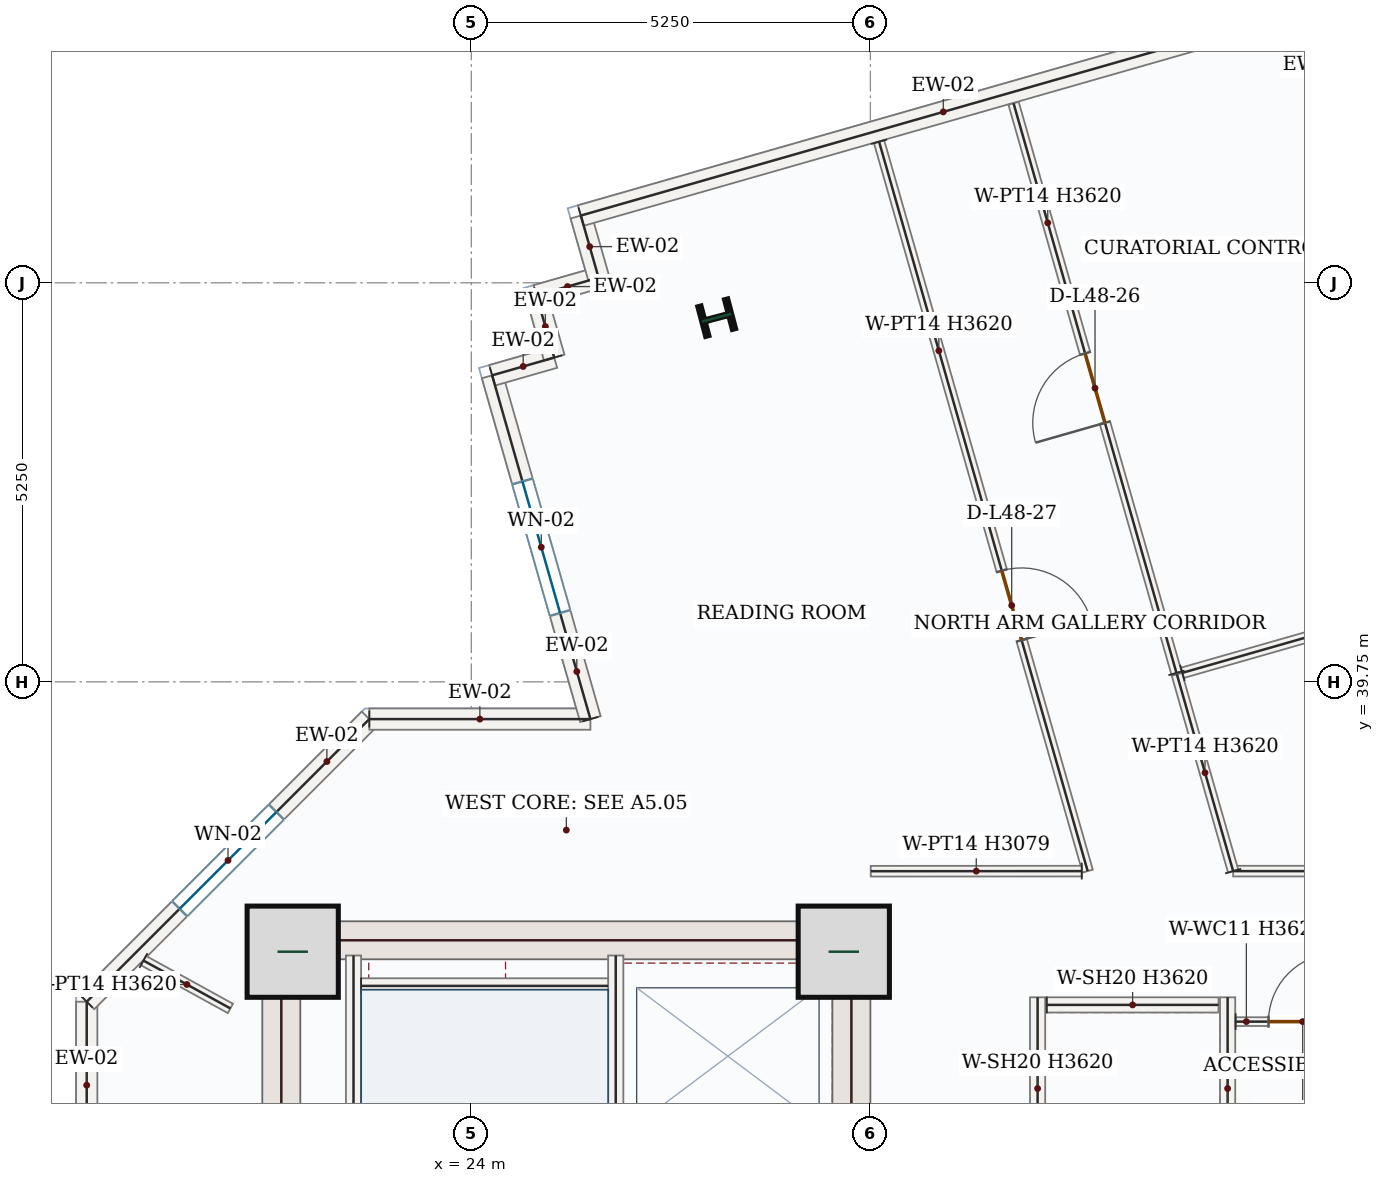
"""IFC4 building model, lengths in metres.
Left out: names, types, materials, properties, quantities, classifications, styles, units other than length and angle.
Written with IfcOpenShell. Run it as: python <this file> out.ifc"""

import sys

from ifc_helpers import new_model, si_unit, direction, frame, frame_2d, origin, origin_2d, place, context, subcontext, project, spatial, rectangle, i_section, extrude, source, transform, mapped, element, fill, save


model = new_model("IFC4")
c1 = context("Model", 3, precision=1e-05, world=origin(), true_north=direction((0.0, 1.0)))
c2 = subcontext(c1, "Body", "Model", "MODEL_VIEW")
j1 = project(units=[si_unit("LENGTHUNIT", "METRE"), si_unit("PLANEANGLEUNIT", "RADIAN")], contexts=[c1])
p1 = place(None, origin())
s1 = spatial("IfcSite", under=j1, at=p1, CompositionType="ELEMENT")
p2 = place(p1, origin())
s2 = spatial("IfcBuilding", under=s1, at=p2, CompositionType="ELEMENT")
p3 = place(p2, frame((0.0, 0.0, 205.8)))
s3 = spatial("IfcBuildingStorey", under=s2, at=p3, CompositionType="ELEMENT", Elevation=205.8)
m1 = source(origin(), c2, "Body", "SweptSolid", [
    extrude(rectangle(XDim=8.55, YDim=0.5, at=frame_2d((4.275, 0.0))), origin(), (0.0, 0.0, 1.0), 3.62),
])
p4 = place(p3, frame((21.5, 28.05, 0.0), z_axis=(0.0, 0.0, 1.0), x_axis=(0.0, 1.0, 0.0)))
e1 = element("IfcWall", 1, at=p4, inside=s3, PredefinedType="SHEAR", context=c2, shape_type="MappedRepresentation", body=[
    mapped(m1, transform((0.0, 0.0, 0.0), x_axis=(1.0, 0.0, 0.0), y_axis=(0.0, 1.0, 0.0), z_axis=(0.0, 0.0, 1.0), scale=1.0)),
])
p5 = place(p3, frame((29.0, 28.05, 0.0), z_axis=(0.0, 0.0, 1.0), x_axis=(0.0, 1.0, 0.0)))
e2 = element("IfcWall", 2, at=p5, inside=s3, PredefinedType="SHEAR", context=c2, shape_type="SweptSolid", body=[
    extrude(rectangle(XDim=8.55, YDim=0.5, at=frame_2d((4.275, 0.0))), origin(), (0.0, 0.0, 1.0), 3.62),
])
p6 = place(p5, frame((1.5, 0.0, 0.0)))
e3 = element("IfcOpeningElement", 3, at=p6, cuts=e2, PredefinedType="OPENING", context=c2, shape_type="SweptSolid", body=[
    extrude(rectangle(XDim=1.1, YDim=2.2, at=frame_2d((0.55, 1.1))), frame((0.0, 0.26, 0.0), z_axis=(0.0, -1.0, 0.0), x_axis=(1.0, 0.0, 0.0)), (0.0, 0.0, 1.0), 0.52),
])
m2 = source(origin(), c2, "Body", "SweptSolid", [
    extrude(rectangle(XDim=7.0, YDim=0.5, at=frame_2d((3.5, 0.0))), origin(), (0.0, 0.0, 1.0), 3.62),
])
p7 = place(p3, frame((21.75, 36.35, 0.0), z_axis=(0.0, 0.0, 1.0), x_axis=(1.0, 0.0, 0.0)))
e4 = element("IfcWall", 4, at=p7, inside=s3, PredefinedType="SHEAR", context=c2, shape_type="MappedRepresentation", body=[
    mapped(m2, transform((0.0, 0.0, 0.0), x_axis=(1.0, 0.0, 0.0), y_axis=(0.0, 1.0, 0.0), z_axis=(0.0, 0.0, 1.0), scale=1.0)),
])
m3 = source(origin(), c2, "Body", "SweptSolid", [
    extrude(rectangle(XDim=1.2, YDim=1.2, at=origin_2d()), origin(), (0.0, 0.0, 1.0), 3.9),
])
for number, where, z_axis, x_axis in (
    (5, (21.65, 36.2, 0.0), (0.0, 0.0, 1.0), (1.0, 0.0, 0.0)),
    (6, (28.9, 36.2, 0.0), (0.0, 0.0, 1.0), (1.0, 0.0, 0.0)),
):
    element("IfcColumn", number, at=place(p3, frame(where, z_axis=z_axis, x_axis=x_axis)), inside=s3, PredefinedType="COLUMN", context=c2, shape_type="MappedRepresentation", body=[
        mapped(m3, transform((0.0, 0.0, 0.0), x_axis=(1.0, 0.0, 0.0), y_axis=(0.0, 1.0, 0.0), z_axis=(0.0, 0.0, 1.0), scale=1.0)),
    ])
m4 = source(origin(), c2, "Body", "SweptSolid", [
    extrude(i_section(OverallWidth=0.404, OverallDepth=0.407, WebThickness=0.027, FlangeThickness=0.044, FilletRadius=0.018, at=origin_2d()), origin(), (0.0, 0.0, 1.0), 3.9),
])
p8 = place(p3, frame((27.228, 44.541, 0.0), z_axis=(0.0, 0.0, 1.0), x_axis=(-0.255445757936, 0.966823388604, 0.0)))
e7 = element("IfcColumn", 7, at=p8, inside=s3, PredefinedType="COLUMN", context=c2, shape_type="MappedRepresentation", body=[
    mapped(m4, transform((0.0, 0.0, 0.0), x_axis=(1.0, 0.0, 0.0), y_axis=(0.0, 1.0, 0.0), z_axis=(0.0, 0.0, 1.0), scale=1.0)),
])
p9 = place(p3, frame((18.94, 29.048, 0.0), z_axis=(0.0, 0.0, 1.0), x_axis=(0.0, 1.0, 0.0)))
e8 = element("IfcWall", 8, at=p9, inside=s3, PredefinedType="SOLIDWALL", context=c2, shape_type="SweptSolid", body=[
    extrude(rectangle(XDim=6.494, YDim=0.28, at=frame_2d((3.247, 0.0))), origin(), (0.0, 0.0, 1.0), 3.62),
])
p10 = place(p9, frame((2.347, 0.0, 0.85)))
e9 = element("IfcOpeningElement", 9, at=p10, cuts=e8, PredefinedType="OPENING", context=c2, shape_type="SweptSolid", body=[
    extrude(rectangle(XDim=1.8, YDim=1.75, at=frame_2d((0.9, 0.875))), frame((0.0, 0.15, 0.0), z_axis=(0.0, -1.0, 0.0), x_axis=(1.0, 0.0, 0.0)), (0.0, 0.0, 1.0), 0.3),
])
p11 = place(p3, frame((18.94, 35.542, 0.0), z_axis=(0.0, 0.0, 1.0), x_axis=(0.707106781187, 0.707106781187, 0.0)))
e10 = element("IfcWall", 10, at=p11, inside=s3, PredefinedType="SOLIDWALL", context=c2, shape_type="SweptSolid", body=[
    extrude(rectangle(XDim=5.258, YDim=0.28, at=frame_2d((2.629, 0.0))), origin(), (0.0, 0.0, 1.0), 3.62),
])
p12 = place(p11, frame((1.729, 0.0, 0.85)))
e11 = element("IfcOpeningElement", 11, at=p12, cuts=e10, PredefinedType="OPENING", context=c2, shape_type="SweptSolid", body=[
    extrude(rectangle(XDim=1.8, YDim=1.75, at=frame_2d((0.9, 0.875))), frame((0.0, 0.15, 0.0), z_axis=(0.0, -1.0, 0.0), x_axis=(1.0, 0.0, 0.0)), (0.0, 0.0, 1.0), 0.3),
])
m5 = source(origin(), c2, "Body", "SweptSolid", [
    extrude(rectangle(XDim=2.909, YDim=0.28, at=frame_2d((1.455, 0.0))), origin(), (0.0, 0.0, 1.0), 3.62),
])
p13 = place(p3, frame((22.658, 39.26, 0.0), z_axis=(0.0, 0.0, 1.0), x_axis=(1.0, 0.0, 0.0)))
e12 = element("IfcWall", 12, at=p13, inside=s3, PredefinedType="SOLIDWALL", context=c2, shape_type="MappedRepresentation", body=[
    mapped(m5, transform((0.0, 0.0, 0.0), x_axis=(1.0, 0.0, 0.0), y_axis=(0.0, 1.0, 0.0), z_axis=(0.0, 0.0, 1.0), scale=1.0)),
])
p14 = place(p3, frame((25.567, 39.26, 0.0), z_axis=(0.0, 0.0, 1.0), x_axis=(-0.274981611661, 0.961449485542, 0.0)))
e13 = element("IfcWall", 13, at=p14, inside=s3, PredefinedType="SOLIDWALL", context=c2, shape_type="SweptSolid", body=[
    extrude(rectangle(XDim=4.704, YDim=0.28, at=frame_2d((2.352, 0.0))), origin(), (0.0, 0.0, 1.0), 3.62),
])
p15 = place(p14, frame((1.452, 0.0, 0.85)))
e14 = element("IfcOpeningElement", 14, at=p15, cuts=e13, PredefinedType="OPENING", context=c2, shape_type="SweptSolid", body=[
    extrude(rectangle(XDim=1.8, YDim=1.75, at=frame_2d((0.9, 0.875))), frame((0.0, 0.15, 0.0), z_axis=(0.0, -1.0, 0.0), x_axis=(1.0, 0.0, 0.0)), (0.0, 0.0, 1.0), 0.3),
])
m6 = source(origin(), c2, "Body", "SweptSolid", [
    extrude(rectangle(XDim=0.85, YDim=0.28, at=frame_2d((0.425, 0.0))), origin(), (0.0, 0.0, 1.0), 3.62),
])
p16 = place(p3, frame((24.273, 43.782, 0.0), z_axis=(0.0, 0.0, 1.0), x_axis=(0.961469728335, 0.274910824624, 0.0)))
e15 = element("IfcWall", 15, at=p16, inside=s3, PredefinedType="SOLIDWALL", context=c2, shape_type="MappedRepresentation", body=[
    mapped(m6, transform((0.0, 0.0, 0.0), x_axis=(1.0, 0.0, 0.0), y_axis=(0.0, 1.0, 0.0), z_axis=(0.0, 0.0, 1.0), scale=1.0)),
])
m7 = source(origin(), c2, "Body", "SweptSolid", [
    extrude(rectangle(XDim=0.85, YDim=0.28, at=frame_2d((0.425, 0.0))), origin(), (0.0, 0.0, 1.0), 3.62),
])
p17 = place(p3, frame((25.091, 44.016, 0.0), z_axis=(0.0, 0.0, 1.0), x_axis=(-0.274834915789, 0.961491429532, 0.0)))
e16 = element("IfcWall", 16, at=p17, inside=s3, PredefinedType="SOLIDWALL", context=c2, shape_type="MappedRepresentation", body=[
    mapped(m7, transform((0.0, 0.0, 0.0), x_axis=(1.0, 0.0, 0.0), y_axis=(0.0, 1.0, 0.0), z_axis=(0.0, 0.0, 1.0), scale=1.0)),
])
p18 = place(p3, frame((24.857, 44.833, 0.0), z_axis=(0.0, 0.0, 1.0), x_axis=(0.961469728335, 0.274910824624, 0.0)))
e17 = element("IfcWall", 17, at=p18, inside=s3, PredefinedType="SOLIDWALL", context=c2, shape_type="MappedRepresentation", body=[
    mapped(m6, transform((0.0, 0.0, 0.0), x_axis=(1.0, 0.0, 0.0), y_axis=(0.0, 1.0, 0.0), z_axis=(0.0, 0.0, 1.0), scale=1.0)),
])
p19 = place(p3, frame((25.674, 45.067, 0.0), z_axis=(0.0, 0.0, 1.0), x_axis=(-0.274834915789, 0.961491429532, 0.0)))
e18 = element("IfcWall", 18, at=p19, inside=s3, PredefinedType="SOLIDWALL", context=c2, shape_type="MappedRepresentation", body=[
    mapped(m7, transform((0.0, 0.0, 0.0), x_axis=(1.0, 0.0, 0.0), y_axis=(0.0, 1.0, 0.0), z_axis=(0.0, 0.0, 1.0), scale=1.0)),
])
m8 = source(origin(), c2, "Body", "SweptSolid", [
    extrude(rectangle(XDim=9.92, YDim=0.28, at=frame_2d((4.96, 0.0))), origin(), (0.0, 0.0, 1.0), 3.62),
])
p20 = place(p3, frame((25.44, 45.885, 0.0), z_axis=(0.0, 0.0, 1.0), x_axis=(0.961457051276, 0.274955157346, 0.0)))
e19 = element("IfcWall", 19, at=p20, inside=s3, PredefinedType="SOLIDWALL", context=c2, shape_type="MappedRepresentation", body=[
    mapped(m8, transform((0.0, 0.0, 0.0), x_axis=(1.0, 0.0, 0.0), y_axis=(0.0, 1.0, 0.0), z_axis=(0.0, 0.0, 1.0), scale=1.0)),
])
p21 = place(p3, frame((34.978, 48.612, 0.0), z_axis=(0.0, 0.0, 1.0), x_axis=(0.275176346112, -0.961393768724, 0.0)))
e20 = element("IfcWall", 20, at=p21, inside=s3, PredefinedType="SOLIDWALL", context=c2, shape_type="MappedRepresentation", body=[
    mapped(m6, transform((0.0, 0.0, 0.0), x_axis=(1.0, 0.0, 0.0), y_axis=(0.0, 1.0, 0.0), z_axis=(0.0, 0.0, 1.0), scale=1.0)),
])
m9 = source(origin(), c2, "Body", "SweptSolid", [
    extrude(rectangle(XDim=7.87, YDim=0.2, at=frame_2d((3.935, 0.0))), origin(), (0.0, 0.0, 1.0), 3.62),
])
p22 = place(p3, frame((22.45, 28.28, 0.0), z_axis=(0.0, 0.0, 1.0), x_axis=(0.0, 1.0, 0.0)))
e21 = element("IfcWall", 21, at=p22, inside=s3, PredefinedType="SOLIDWALL", context=c2, shape_type="MappedRepresentation", body=[
    mapped(m9, transform((0.0, 0.0, 0.0), x_axis=(1.0, 0.0, 0.0), y_axis=(0.0, 1.0, 0.0), z_axis=(0.0, 0.0, 1.0), scale=1.0)),
])
p23 = place(p3, frame((25.9, 28.15, 0.0), z_axis=(0.0, 0.0, 1.0), x_axis=(0.0, 1.0, 0.0)))
e22 = element("IfcWall", 22, at=p23, inside=s3, PredefinedType="SOLIDWALL", context=c2, shape_type="SweptSolid", body=[
    extrude(rectangle(XDim=8.0, YDim=0.2, at=frame_2d((4.0, 0.0))), origin(), (0.0, 0.0, 1.0), 3.62),
])
p24 = place(p23, frame((0.4, 0.0, 0.0)))
e23 = element("IfcOpeningElement", 23, at=p24, cuts=e22, PredefinedType="OPENING", context=c2, shape_type="SweptSolid", body=[
    extrude(rectangle(XDim=1.05, YDim=2.15, at=frame_2d((0.525, 1.075))), frame((0.0, 0.11, 0.0), z_axis=(0.0, -1.0, 0.0), x_axis=(1.0, 0.0, 0.0)), (0.0, 0.0, 1.0), 0.22),
])
m10 = source(origin(), c2, "Body", "SweptSolid", [
    extrude(rectangle(XDim=3.25, YDim=0.2, at=frame_2d((1.625, 0.0))), origin(), (0.0, 0.0, 1.0), 3.62),
])
p25 = place(p3, frame((22.55, 35.75, 0.0), z_axis=(0.0, 0.0, 1.0), x_axis=(1.0, 0.0, 0.0)))
e24 = element("IfcWall", 24, at=p25, inside=s3, PredefinedType="SOLIDWALL", context=c2, shape_type="MappedRepresentation", body=[
    mapped(m10, transform((0.0, 0.0, 0.0), x_axis=(1.0, 0.0, 0.0), y_axis=(0.0, 1.0, 0.0), z_axis=(0.0, 0.0, 1.0), scale=1.0)),
])
m11 = source(origin(), c2, "Body", "SweptSolid", [
    extrude(rectangle(XDim=2.4, YDim=0.2, at=frame_2d((1.2, 0.0))), origin(), (0.0, 0.0, 1.0), 3.62),
])
for number, where, z_axis, x_axis in (
    (25, (31.45, 33.2, 0.0), (0.0, 0.0, 1.0), (0.0, 1.0, 0.0)),
    (26, (33.95, 33.2, 0.0), (0.0, 0.0, 1.0), (0.0, 1.0, 0.0)),
):
    element("IfcWall", number, at=place(p3, frame(where, z_axis=z_axis, x_axis=x_axis)), inside=s3, PredefinedType="SOLIDWALL", context=c2, shape_type="MappedRepresentation", body=[
        mapped(m11, transform((0.0, 0.0, 0.0), x_axis=(1.0, 0.0, 0.0), y_axis=(0.0, 1.0, 0.0), z_axis=(0.0, 0.0, 1.0), scale=1.0)),
    ])
m12 = source(origin(), c2, "Body", "SweptSolid", [
    extrude(rectangle(XDim=2.26, YDim=0.2, at=frame_2d((1.13, 0.0))), origin(), (0.0, 0.0, 1.0), 3.62),
])
p26 = place(p3, frame((31.57, 35.5, 0.0), z_axis=(0.0, 0.0, 1.0), x_axis=(1.0, 0.0, 0.0)))
e27 = element("IfcWall", 27, at=p26, inside=s3, PredefinedType="SOLIDWALL", context=c2, shape_type="MappedRepresentation", body=[
    mapped(m12, transform((0.0, 0.0, 0.0), x_axis=(1.0, 0.0, 0.0), y_axis=(0.0, 1.0, 0.0), z_axis=(0.0, 0.0, 1.0), scale=1.0)),
])
p27 = place(p3, frame((34.055, 35.28, 0.0), z_axis=(0.0, 0.0, 1.0), x_axis=(1.0, 0.0, 0.0)))
e28 = element("IfcWall", 28, at=p27, inside=s3, PredefinedType="PARTITIONING", context=c2, shape_type="SweptSolid", body=[
    extrude(rectangle(XDim=1.473, YDim=0.115, at=frame_2d((0.736, 0.0))), origin(), (0.0, 0.0, 1.0), 3.62),
])
p28 = place(p27, frame((0.433, 0.0, 0.0)))
e29 = element("IfcOpeningElement", 29, at=p28, cuts=e28, PredefinedType="OPENING", context=c2, shape_type="SweptSolid", body=[
    extrude(rectangle(XDim=0.9, YDim=2.1, at=frame_2d((0.45, 1.05))), frame((0.0, 0.067, 0.0), z_axis=(0.0, -1.0, 0.0), x_axis=(1.0, 0.0, 0.0)), (0.0, 0.0, 1.0), 0.135),
])
p29 = place(p3, frame((41.775, 37.26, 0.0), z_axis=(0.0, 0.0, 1.0), x_axis=(-1.0, 0.0, 0.0)))
e30 = element("IfcWall", 30, at=p29, inside=s3, PredefinedType="PARTITIONING", context=c2, shape_type="SweptSolid", body=[
    extrude(rectangle(XDim=7.753, YDim=0.14, at=frame_2d((3.876, 0.0))), origin(), (0.0, 0.0, 1.0), 3.62),
])
p30 = place(p29, frame((5.306, 0.0, 0.0)))
e31 = element("IfcOpeningElement", 31, at=p30, cuts=e30, PredefinedType="OPENING", context=c2, shape_type="SweptSolid", body=[
    extrude(rectangle(XDim=0.95, YDim=2.15, at=frame_2d((0.475, 1.075))), frame((0.0, 0.08, 0.0), z_axis=(0.0, -1.0, 0.0), x_axis=(1.0, 0.0, 0.0)), (0.0, 0.0, 1.0), 0.16),
])
m13 = source(origin(), c2, "Body", "SweptSolid", [
    extrude(rectangle(XDim=2.692, YDim=0.14, at=frame_2d((1.346, 0.0))), origin(), (0.0, 0.0, 1.0), 3.62),
])
p31 = place(p3, frame((34.023, 37.26, 0.0), z_axis=(0.0, 0.0, 1.0), x_axis=(-0.27500862401, 0.961441759401, 0.0)))
e32 = element("IfcWall", 32, at=p31, inside=s3, PredefinedType="PARTITIONING", context=c2, shape_type="MappedRepresentation", body=[
    mapped(m13, transform((0.0, 0.0, 0.0), x_axis=(1.0, 0.0, 0.0), y_axis=(0.0, 1.0, 0.0), z_axis=(0.0, 0.0, 1.0), scale=1.0)),
])
m14 = source(origin(), c2, "Body", "SweptSolid", [
    extrude(rectangle(XDim=5.52, YDim=0.14, at=frame_2d((2.76, 0.0))), origin(), (0.0, 0.0, 1.0), 3.62),
])
p32 = place(p3, frame((33.354, 39.869, 0.0), z_axis=(0.0, 0.0, 1.0), x_axis=(0.961455490798, 0.274960613933, 0.0)))
e33 = element("IfcWall", 33, at=p32, inside=s3, PredefinedType="PARTITIONING", context=c2, shape_type="MappedRepresentation", body=[
    mapped(m14, transform((0.0, 0.0, 0.0), x_axis=(1.0, 0.0, 0.0), y_axis=(0.0, 1.0, 0.0), z_axis=(0.0, 0.0, 1.0), scale=1.0)),
])
p33 = place(p3, frame((33.277, 39.867, 0.0), z_axis=(0.0, 0.0, 1.0), x_axis=(-0.274985856522, 0.96144827147, 0.0)))
e34 = element("IfcWall", 34, at=p33, inside=s3, PredefinedType="PARTITIONING", context=c2, shape_type="SweptSolid", body=[
    extrude(rectangle(XDim=7.795, YDim=0.14, at=frame_2d((3.897, 0.0))), origin(), (0.0, 0.0, 1.0), 3.62),
])
p34 = place(p33, frame((3.423, 0.0, 0.0)))
e35 = element("IfcOpeningElement", 35, at=p34, cuts=e34, PredefinedType="OPENING", context=c2, shape_type="SweptSolid", body=[
    extrude(rectangle(XDim=0.95, YDim=2.15, at=frame_2d((0.475, 1.075))), frame((0.0, 0.08, 0.0), z_axis=(0.0, -1.0, 0.0), x_axis=(1.0, 0.0, 0.0)), (0.0, 0.0, 1.0), 0.16),
])
m15 = source(origin(), c2, "Body", "SweptSolid", [
    extrude(rectangle(XDim=1.305, YDim=0.14, at=frame_2d((0.653, 0.0))), origin(), (0.0, 0.0, 1.0), 3.62),
])
p35 = place(p3, frame((19.686, 36.083, 0.0), z_axis=(0.0, 0.0, 1.0), x_axis=(0.876117183384, -0.48209820678, 0.0)))
e36 = element("IfcWall", 36, at=p35, inside=s3, PredefinedType="PARTITIONING", context=c2, shape_type="MappedRepresentation", body=[
    mapped(m15, transform((0.0, 0.0, 0.0), x_axis=(1.0, 0.0, 0.0), y_axis=(0.0, 1.0, 0.0), z_axis=(0.0, 0.0, 1.0), scale=1.0)),
])
p36 = place(p3, frame((29.365, 46.856, 0.0), z_axis=(0.0, 0.0, 1.0), x_axis=(0.274969885882, -0.961452839123, 0.0)))
e37 = element("IfcWall", 37, at=p36, inside=s3, PredefinedType="PARTITIONING", context=c2, shape_type="SweptSolid", body=[
    extrude(rectangle(XDim=9.981, YDim=0.14, at=frame_2d((4.99, 0.0))), origin(), (0.0, 0.0, 1.0), 3.62),
])
p37 = place(p36, frame((5.87, 0.0, 0.0)))
e38 = element("IfcOpeningElement", 38, at=p37, cuts=e37, PredefinedType="OPENING", context=c2, shape_type="SweptSolid", body=[
    extrude(rectangle(XDim=0.95, YDim=2.15, at=frame_2d((0.475, 1.075))), frame((0.0, 0.08, 0.0), z_axis=(0.0, -1.0, 0.0), x_axis=(1.0, 0.0, 0.0)), (0.0, 0.0, 1.0), 0.16),
])
m16 = source(origin(), c2, "Body", "SweptSolid", [
    extrude(rectangle(XDim=2.776, YDim=0.14, at=frame_2d((1.388, 0.0))), origin(), (0.0, 0.0, 1.0), 3.079),
])
p38 = place(p3, frame((32.031, 37.26, 0.0), z_axis=(0.0, 0.0, 1.0), x_axis=(-0.999999903325, -0.000439715022, 0.0)))
e39 = element("IfcWall", 39, at=p38, inside=s3, PredefinedType="PARTITIONING", context=c2, shape_type="MappedRepresentation", body=[
    mapped(m16, transform((0.0, 0.0, 0.0), x_axis=(1.0, 0.0, 0.0), y_axis=(0.0, 1.0, 0.0), z_axis=(0.0, 0.0, 1.0), scale=1.0)),
])
m17 = source(origin(), c2, "Body", "SweptSolid", [
    extrude(rectangle(XDim=1.8, YDim=1.75, at=frame_2d((0.9, 0.875))), frame((0.0, 0.03, 0.0), z_axis=(0.0, -1.0, 0.0), x_axis=(1.0, 0.0, 0.0)), (0.0, 0.0, 1.0), 0.06),
])
p39 = place(p12, origin())
e40 = element("IfcWindow", 40, at=p39, inside=s3, PartitioningType="DOUBLE_PANEL_VERTICAL", PredefinedType="WINDOW", context=c2, shape_type="MappedRepresentation", body=[
    mapped(m17, transform((0.0, 0.0, 0.0), x_axis=(1.0, 0.0, 0.0), y_axis=(0.0, 1.0, 0.0), z_axis=(0.0, 0.0, 1.0), scale=1.0)),
])
fill(e11, e40)
p40 = place(p15, origin())
e41 = element("IfcWindow", 41, at=p40, inside=s3, PartitioningType="DOUBLE_PANEL_VERTICAL", PredefinedType="WINDOW", context=c2, shape_type="MappedRepresentation", body=[
    mapped(m17, transform((0.0, 0.0, 0.0), x_axis=(1.0, 0.0, 0.0), y_axis=(0.0, 1.0, 0.0), z_axis=(0.0, 0.0, 1.0), scale=1.0)),
])
fill(e14, e41)
m18 = source(origin(), c2, "Body", "SweptSolid", [
    extrude(rectangle(XDim=0.9, YDim=2.1, at=frame_2d((0.45, 1.05))), frame((0.0, 0.025, 0.0), z_axis=(0.0, -1.0, 0.0), x_axis=(1.0, 0.0, 0.0)), (0.0, 0.0, 1.0), 0.05),
])
p41 = place(p28, origin())
e42 = element("IfcDoor", 42, at=p41, inside=s3, OperationType="SINGLE_SWING_RIGHT", PredefinedType="DOOR", context=c2, shape_type="MappedRepresentation", body=[
    mapped(m18, transform((0.0, 0.0, 0.0), x_axis=(1.0, 0.0, 0.0), y_axis=(0.0, 1.0, 0.0), z_axis=(0.0, 0.0, 1.0), scale=1.0)),
])
fill(e29, e42)
m19 = source(origin(), c2, "Body", "SweptSolid", [
    extrude(rectangle(XDim=0.95, YDim=2.15, at=frame_2d((0.475, 1.075))), frame((0.0, 0.025, 0.0), z_axis=(0.0, -1.0, 0.0), x_axis=(1.0, 0.0, 0.0)), (0.0, 0.0, 1.0), 0.05),
])
p42 = place(p34, origin())
e43 = element("IfcDoor", 43, at=p42, inside=s3, OperationType="SINGLE_SWING_LEFT", PredefinedType="DOOR", context=c2, shape_type="MappedRepresentation", body=[
    mapped(m19, transform((0.0, 0.0, 0.0), x_axis=(1.0, 0.0, 0.0), y_axis=(0.0, 1.0, 0.0), z_axis=(0.0, 0.0, 1.0), scale=1.0)),
])
fill(e35, e43)
p43 = place(p37, origin())
e44 = element("IfcDoor", 44, at=p43, inside=s3, OperationType="SINGLE_SWING_RIGHT", PredefinedType="DOOR", context=c2, shape_type="MappedRepresentation", body=[
    mapped(m19, transform((0.0, 0.0, 0.0), x_axis=(1.0, 0.0, 0.0), y_axis=(0.0, 1.0, 0.0), z_axis=(0.0, 0.0, 1.0), scale=1.0)),
])
fill(e38, e44)
save(model, sys.argv[1])
